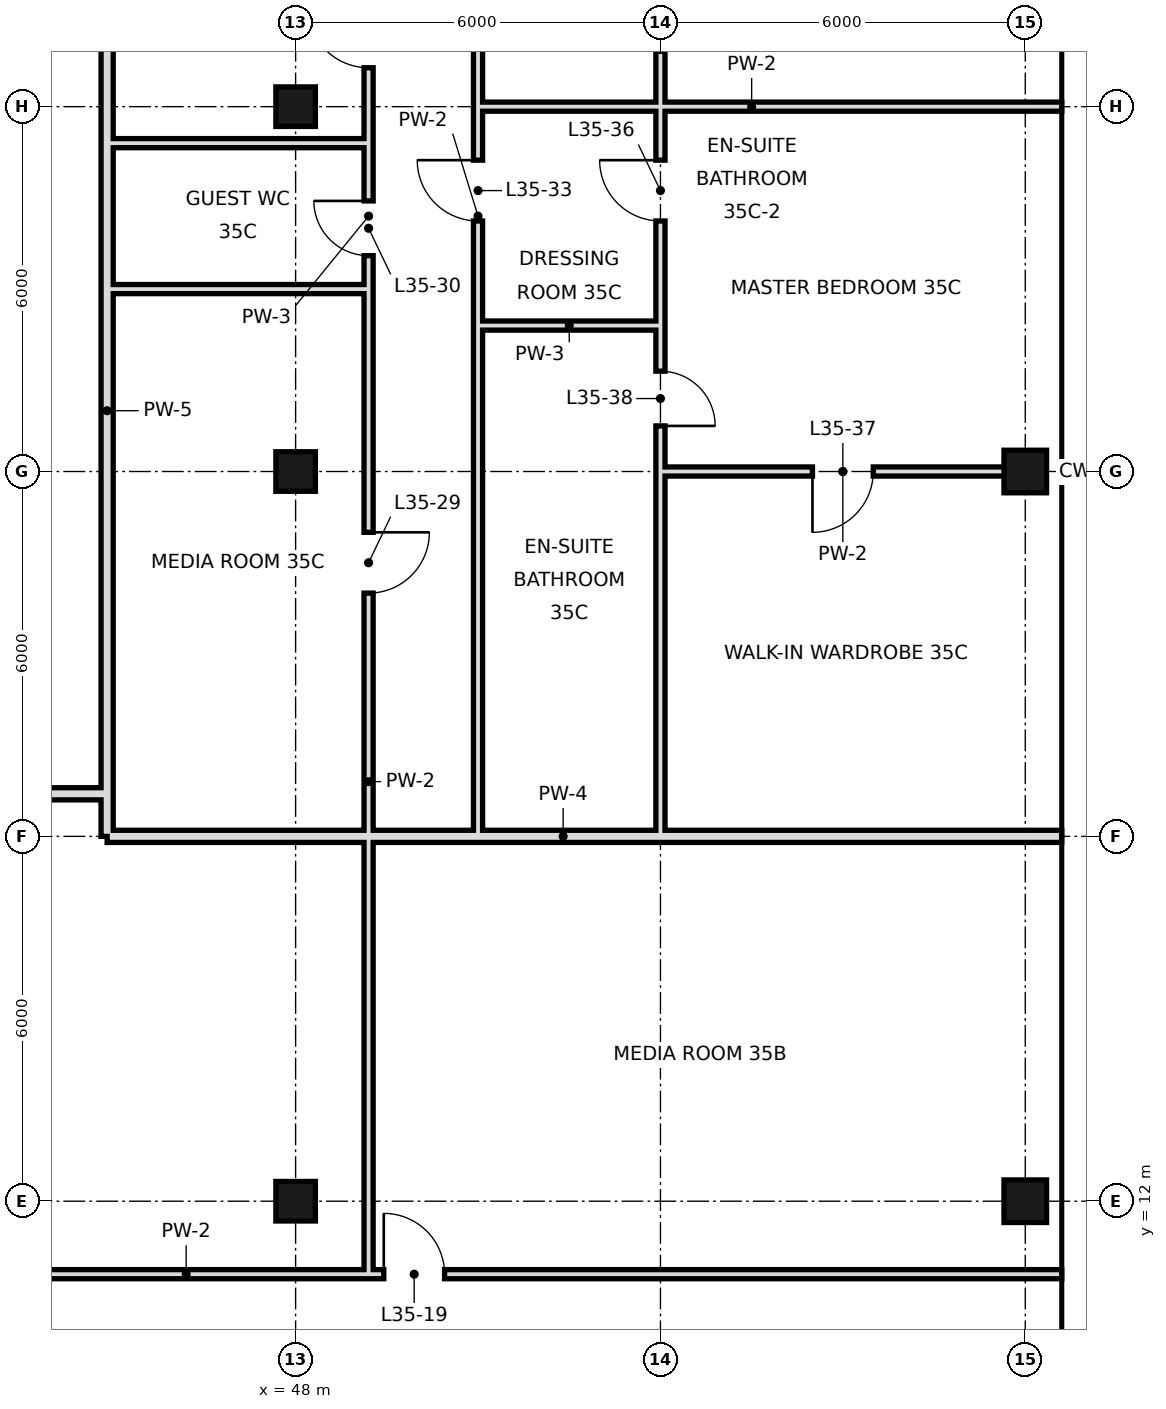
"""IFC4 building model, lengths in metres.
Left out: names, types, materials, properties, quantities, classifications, styles, units other than length and angle.
Written with IfcOpenShell. Run it as: python <this file> out.ifc"""

import sys

from ifc_helpers import new_model, si_unit, direction, frame, frame_2d, origin, origin_2d, place, context, subcontext, project, spatial, rectangle, hollow_rectangle, extrude, element, fill, save


model = new_model("IFC4")
c1 = context("Model", 3, precision=1e-05, world=origin(), true_north=direction((0.0, 1.0)))
c2 = subcontext(c1, "Body", "Model", "MODEL_VIEW")
j1 = project(units=[si_unit("LENGTHUNIT", "METRE"), si_unit("PLANEANGLEUNIT", "RADIAN")], contexts=[c1])
p1 = place(None, origin())
s1 = spatial("IfcSite", under=j1, at=p1, CompositionType="ELEMENT")
p2 = place(p1, origin())
s2 = spatial("IfcBuilding", under=s1, at=p2, CompositionType="ELEMENT")
p3 = place(p2, frame((0.0, 0.0, 154.6)))
s3 = spatial("IfcBuildingStorey", under=s2, at=p3, CompositionType="ELEMENT", Elevation=154.6)
for number, where, z_axis, x_axis in (
    (1, (48.0, 12.0, 0.0), (0.0, 0.0, 1.0), (1.0, 0.0, 0.0)),
    (2, (48.0, 24.0, 0.0), (0.0, 0.0, 1.0), (1.0, 0.0, 0.0)),
    (3, (48.0, 30.0, 0.0), (0.0, 0.0, 1.0), (1.0, 0.0, 0.0)),
):
    element("IfcColumn", number, at=place(p3, frame(where, z_axis=z_axis, x_axis=x_axis)), inside=s3, PredefinedType="COLUMN", context=c2, shape_type="SweptSolid", body=[
        extrude(hollow_rectangle(XDim=0.65, YDim=0.65, WallThickness=0.032, at=origin_2d()), origin(), (0.0, 0.0, 1.0), 3.6),
    ])
for number, where, z_axis, x_axis in (
    (4, (60.0, 12.0, 0.0), (0.0, 0.0, 1.0), (1.0, 0.0, 0.0)),
    (5, (60.0, 24.0, 0.0), (0.0, 0.0, 1.0), (1.0, 0.0, 0.0)),
):
    element("IfcColumn", number, at=place(p3, frame(where, z_axis=z_axis, x_axis=x_axis)), inside=s3, PredefinedType="COLUMN", context=c2, shape_type="SweptSolid", body=[
        extrude(hollow_rectangle(XDim=0.7, YDim=0.7, WallThickness=0.036, at=origin_2d()), origin(), (0.0, 0.0, 1.0), 3.6),
    ])
p4 = place(p3, frame((44.9, 18.7, 0.0), z_axis=(0.0, 0.0, 1.0), x_axis=(0.0, 1.0, 0.0)))
e6 = element("IfcWall", 6, at=p4, inside=s3, PredefinedType="SOLIDWALL", context=c2, shape_type="SweptSolid", body=[
    extrude(rectangle(XDim=25.7, YDim=0.2, at=frame_2d((12.85, 0.0))), origin(), (0.0, 0.0, 1.0), 2.97),
])
p5 = place(p4, frame((12.5, 0.0, 0.0)))
e7 = element("IfcOpeningElement", 7, at=p5, cuts=e6, PredefinedType="OPENING", context=c2, shape_type="SweptSolid", body=[
    extrude(rectangle(XDim=1.2, YDim=2.4, at=frame_2d((0.6, 1.2))), frame((0.0, 0.11, 0.0), z_axis=(0.0, -1.0, 0.0), x_axis=(1.0, 0.0, 0.0)), (0.0, 0.0, 1.0), 0.22),
])
p6 = place(p3, frame((44.9, 18.0, 0.0), z_axis=(0.0, 0.0, 1.0), x_axis=(0.0, 1.0, 0.0)))
e8 = element("IfcWall", 8, at=p6, inside=s3, PredefinedType="SOLIDWALL", context=c2, shape_type="SweptSolid", body=[
    extrude(rectangle(XDim=0.7, YDim=0.2, at=frame_2d((0.35, 0.0))), origin(), (0.0, 0.0, 1.0), 2.97),
])
p7 = place(p3, frame((49.2, 10.8, 0.0), z_axis=(0.0, 0.0, 1.0), x_axis=(0.0, 1.0, 0.0)))
e9 = element("IfcWall", 9, at=p7, inside=s3, PredefinedType="PARTITIONING", context=c2, shape_type="SweptSolid", body=[
    extrude(rectangle(XDim=16.2, YDim=0.15, at=frame_2d((8.1, 0.0))), origin(), (0.0, 0.0, 1.0), 3.42),
])
p8 = place(p7, frame((11.2, 0.0, 0.0)))
e10 = element("IfcOpeningElement", 10, at=p8, cuts=e9, PredefinedType="OPENING", context=c2, shape_type="SweptSolid", body=[
    extrude(rectangle(XDim=1.0, YDim=2.4, at=frame_2d((0.5, 1.2))), frame((0.0, 0.085, 0.0), z_axis=(0.0, -1.0, 0.0), x_axis=(1.0, 0.0, 0.0)), (0.0, 0.0, 1.0), 0.17),
])
p9 = place(p3, frame((49.2, 29.4, 0.0), z_axis=(0.0, 0.0, 1.0), x_axis=(0.0, 1.0, 0.0)))
e11 = element("IfcWall", 11, at=p9, inside=s3, PredefinedType="PARTITIONING", context=c2, shape_type="SweptSolid", body=[
    extrude(rectangle(XDim=15.0, YDim=0.15, at=frame_2d((7.5, 0.0))), origin(), (0.0, 0.0, 1.0), 3.42),
])
p10 = place(p9, frame((1.24, 0.0, 0.0)))
e12 = element("IfcOpeningElement", 12, at=p10, cuts=e11, PredefinedType="OPENING", context=c2, shape_type="SweptSolid", body=[
    extrude(rectangle(XDim=1.0, YDim=2.4, at=frame_2d((0.5, 1.2))), frame((0.0, 0.085, 0.0), z_axis=(0.0, -1.0, 0.0), x_axis=(1.0, 0.0, 0.0)), (0.0, 0.0, 1.0), 0.17),
])
p11 = place(p9, frame((9.4, 0.0, 0.0)))
e13 = element("IfcOpeningElement", 13, at=p11, cuts=e11, PredefinedType="OPENING", context=c2, shape_type="SweptSolid", body=[
    extrude(rectangle(XDim=1.0, YDim=2.4, at=frame_2d((0.5, 1.2))), frame((0.0, 0.085, 0.0), z_axis=(0.0, -1.0, 0.0), x_axis=(1.0, 0.0, 0.0)), (0.0, 0.0, 1.0), 0.17),
])
p12 = place(p3, frame((49.2, 27.0, 0.0), z_axis=(0.0, 0.0, 1.0), x_axis=(0.0, 1.0, 0.0)))
e14 = element("IfcWall", 14, at=p12, inside=s3, PredefinedType="PARTITIONING", context=c2, shape_type="SweptSolid", body=[
    extrude(rectangle(XDim=2.4, YDim=0.15, at=frame_2d((1.2, 0.0))), origin(), (0.0, 0.0, 1.0), 3.42),
])
p13 = place(p12, frame((0.55, 0.0, 0.0)))
e15 = element("IfcOpeningElement", 15, at=p13, cuts=e14, PredefinedType="OPENING", context=c2, shape_type="SweptSolid", body=[
    extrude(rectangle(XDim=0.9, YDim=2.4, at=frame_2d((0.45, 1.2))), frame((0.0, 0.085, 0.0), z_axis=(0.0, -1.0, 0.0), x_axis=(1.0, 0.0, 0.0)), (0.0, 0.0, 1.0), 0.17),
])
p14 = place(p3, frame((51.0, 26.4, 0.0), z_axis=(0.0, 0.0, 1.0), x_axis=(0.0, 1.0, 0.0)))
e16 = element("IfcWall", 16, at=p14, inside=s3, PredefinedType="PARTITIONING", context=c2, shape_type="SweptSolid", body=[
    extrude(rectangle(XDim=3.6, YDim=0.15, at=frame_2d((1.8, 0.0))), origin(), (0.0, 0.0, 1.0), 3.42),
])
p15 = place(p14, frame((1.72, 0.0, 0.0)))
e17 = element("IfcOpeningElement", 17, at=p15, cuts=e16, PredefinedType="OPENING", context=c2, shape_type="SweptSolid", body=[
    extrude(rectangle(XDim=1.0, YDim=2.4, at=frame_2d((0.5, 1.2))), frame((0.0, 0.085, 0.0), z_axis=(0.0, -1.0, 0.0), x_axis=(1.0, 0.0, 0.0)), (0.0, 0.0, 1.0), 0.17),
])
p16 = place(p3, frame((51.0, 18.0, 0.0), z_axis=(0.0, 0.0, 1.0), x_axis=(0.0, 1.0, 0.0)))
e18 = element("IfcWall", 18, at=p16, inside=s3, PredefinedType="PARTITIONING", context=c2, shape_type="SweptSolid", body=[
    extrude(rectangle(XDim=8.4, YDim=0.15, at=frame_2d((4.2, 0.0))), origin(), (0.0, 0.0, 1.0), 3.42),
])
p17 = place(p3, frame((51.0, 30.0, 0.0), z_axis=(0.0, 0.0, 1.0), x_axis=(0.0, 1.0, 0.0)))
e19 = element("IfcWall", 19, at=p17, inside=s3, PredefinedType="PARTITIONING", context=c2, shape_type="SweptSolid", body=[
    extrude(rectangle(XDim=3.6, YDim=0.15, at=frame_2d((1.8, 0.0))), origin(), (0.0, 0.0, 1.0), 3.42),
])
p18 = place(p3, frame((54.0, 26.4, 0.0), z_axis=(0.0, 0.0, 1.0), x_axis=(0.0, 1.0, 0.0)))
e20 = element("IfcWall", 20, at=p18, inside=s3, PredefinedType="PARTITIONING", context=c2, shape_type="SweptSolid", body=[
    extrude(rectangle(XDim=3.6, YDim=0.15, at=frame_2d((1.8, 0.0))), origin(), (0.0, 0.0, 1.0), 3.42),
])
p19 = place(p18, frame((1.72, 0.0, 0.0)))
e21 = element("IfcOpeningElement", 21, at=p19, cuts=e20, PredefinedType="OPENING", context=c2, shape_type="SweptSolid", body=[
    extrude(rectangle(XDim=1.0, YDim=2.4, at=frame_2d((0.5, 1.2))), frame((0.0, 0.085, 0.0), z_axis=(0.0, -1.0, 0.0), x_axis=(1.0, 0.0, 0.0)), (0.0, 0.0, 1.0), 0.17),
])
p20 = place(p3, frame((54.0, 18.0, 0.0), z_axis=(0.0, 0.0, 1.0), x_axis=(0.0, 1.0, 0.0)))
e22 = element("IfcWall", 22, at=p20, inside=s3, PredefinedType="PARTITIONING", context=c2, shape_type="SweptSolid", body=[
    extrude(rectangle(XDim=8.4, YDim=0.15, at=frame_2d((4.2, 0.0))), origin(), (0.0, 0.0, 1.0), 3.42),
])
p21 = place(p20, frame((6.75, 0.0, 0.0)))
e23 = element("IfcOpeningElement", 23, at=p21, cuts=e22, PredefinedType="OPENING", context=c2, shape_type="SweptSolid", body=[
    extrude(rectangle(XDim=0.9, YDim=2.4, at=frame_2d((0.45, 1.2))), frame((0.0, 0.085, 0.0), z_axis=(0.0, -1.0, 0.0), x_axis=(1.0, 0.0, 0.0)), (0.0, 0.0, 1.0), 0.17),
])
p22 = place(p3, frame((54.0, 30.0, 0.0), z_axis=(0.0, 0.0, 1.0), x_axis=(0.0, 1.0, 0.0)))
e24 = element("IfcWall", 24, at=p22, inside=s3, PredefinedType="PARTITIONING", context=c2, shape_type="SweptSolid", body=[
    extrude(rectangle(XDim=3.6, YDim=0.15, at=frame_2d((1.8, 0.0))), origin(), (0.0, 0.0, 1.0), 3.42),
])
p23 = place(p22, frame((0.91, 0.0, 0.0)))
e25 = element("IfcOpeningElement", 25, at=p23, cuts=e24, PredefinedType="OPENING", context=c2, shape_type="SweptSolid", body=[
    extrude(rectangle(XDim=0.9, YDim=2.4, at=frame_2d((0.45, 1.2))), frame((0.0, 0.085, 0.0), z_axis=(0.0, -1.0, 0.0), x_axis=(1.0, 0.0, 0.0)), (0.0, 0.0, 1.0), 0.17),
])
p24 = place(p3, frame((31.8, 10.8, 0.0), z_axis=(0.0, 0.0, 1.0), x_axis=(1.0, 0.0, 0.0)))
e26 = element("IfcWall", 26, at=p24, inside=s3, PredefinedType="PARTITIONING", context=c2, shape_type="SweptSolid", body=[
    extrude(rectangle(XDim=28.8, YDim=0.15, at=frame_2d((14.4, 0.0))), origin(), (0.0, 0.0, 1.0), 3.42),
])
p25 = place(p24, frame((1.6, 0.0, 0.0)))
e27 = element("IfcOpeningElement", 27, at=p25, cuts=e26, PredefinedType="OPENING", context=c2, shape_type="SweptSolid", body=[
    extrude(rectangle(XDim=1.0, YDim=2.4, at=frame_2d((0.5, 1.2))), frame((0.0, 0.085, 0.0), z_axis=(0.0, -1.0, 0.0), x_axis=(1.0, 0.0, 0.0)), (0.0, 0.0, 1.0), 0.17),
])
p26 = place(p24, frame((9.22, 0.0, 0.0)))
e28 = element("IfcOpeningElement", 28, at=p26, cuts=e26, PredefinedType="OPENING", context=c2, shape_type="SweptSolid", body=[
    extrude(rectangle(XDim=1.0, YDim=2.4, at=frame_2d((0.5, 1.2))), frame((0.0, 0.085, 0.0), z_axis=(0.0, -1.0, 0.0), x_axis=(1.0, 0.0, 0.0)), (0.0, 0.0, 1.0), 0.17),
])
p27 = place(p24, frame((17.65, 0.0, 0.0)))
e29 = element("IfcOpeningElement", 29, at=p27, cuts=e26, PredefinedType="OPENING", context=c2, shape_type="SweptSolid", body=[
    extrude(rectangle(XDim=1.0, YDim=2.4, at=frame_2d((0.5, 1.2))), frame((0.0, 0.085, 0.0), z_axis=(0.0, -1.0, 0.0), x_axis=(1.0, 0.0, 0.0)), (0.0, 0.0, 1.0), 0.17),
])
p28 = place(p3, frame((44.9, 18.0, 0.0), z_axis=(0.0, 0.0, 1.0), x_axis=(1.0, 0.0, 0.0)))
e30 = element("IfcWall", 30, at=p28, inside=s3, PredefinedType="SOLIDWALL", context=c2, shape_type="SweptSolid", body=[
    extrude(rectangle(XDim=15.7, YDim=0.2, at=frame_2d((7.85, 0.0))), origin(), (0.0, 0.0, 1.0), 2.72),
])
p29 = place(p3, frame((31.8, 18.7, 0.0), z_axis=(0.0, 0.0, 1.0), x_axis=(1.0, 0.0, 0.0)))
e31 = element("IfcWall", 31, at=p29, inside=s3, PredefinedType="SOLIDWALL", context=c2, shape_type="SweptSolid", body=[
    extrude(rectangle(XDim=13.1, YDim=0.2, at=frame_2d((6.55, 0.0))), origin(), (0.0, 0.0, 1.0), 2.72),
])
p30 = place(p29, frame((1.54, 0.0, 0.0)))
e32 = element("IfcOpeningElement", 32, at=p30, cuts=e31, PredefinedType="OPENING", context=c2, shape_type="SweptSolid", body=[
    extrude(rectangle(XDim=1.2, YDim=2.4, at=frame_2d((0.6, 1.2))), frame((0.0, 0.11, 0.0), z_axis=(0.0, -1.0, 0.0), x_axis=(1.0, 0.0, 0.0)), (0.0, 0.0, 1.0), 0.22),
])
p31 = place(p3, frame((54.0, 24.0, 0.0), z_axis=(0.0, 0.0, 1.0), x_axis=(1.0, 0.0, 0.0)))
e33 = element("IfcWall", 33, at=p31, inside=s3, PredefinedType="PARTITIONING", context=c2, shape_type="SweptSolid", body=[
    extrude(rectangle(XDim=6.0, YDim=0.15, at=frame_2d((3.0, 0.0))), origin(), (0.0, 0.0, 1.0), 2.72),
])
p32 = place(p31, frame((2.5, 0.0, 0.0)))
e34 = element("IfcOpeningElement", 34, at=p32, cuts=e33, PredefinedType="OPENING", context=c2, shape_type="SweptSolid", body=[
    extrude(rectangle(XDim=1.0, YDim=2.4, at=frame_2d((0.5, 1.2))), frame((0.0, 0.085, 0.0), z_axis=(0.0, -1.0, 0.0), x_axis=(1.0, 0.0, 0.0)), (0.0, 0.0, 1.0), 0.17),
])
p33 = place(p3, frame((51.0, 26.4, 0.0), z_axis=(0.0, 0.0, 1.0), x_axis=(1.0, 0.0, 0.0)))
e35 = element("IfcWall", 35, at=p33, inside=s3, PredefinedType="PARTITIONING", context=c2, shape_type="SweptSolid", body=[
    extrude(rectangle(XDim=3.0, YDim=0.15, at=frame_2d((1.5, 0.0))), origin(), (0.0, 0.0, 1.0), 3.42),
])
for number, where, z_axis, x_axis in (
    (36, (44.9, 27.0, 0.0), (0.0, 0.0, 1.0), (1.0, 0.0, 0.0)),
    (37, (44.9, 29.4, 0.0), (0.0, 0.0, 1.0), (1.0, 0.0, 0.0)),
):
    element("IfcWall", number, at=place(p3, frame(where, z_axis=z_axis, x_axis=x_axis)), inside=s3, PredefinedType="PARTITIONING", context=c2, shape_type="SweptSolid", body=[
        extrude(rectangle(XDim=4.3, YDim=0.15, at=frame_2d((2.15, 0.0))), origin(), (0.0, 0.0, 1.0), 3.42),
    ])
p34 = place(p3, frame((54.0, 30.0, 0.0), z_axis=(0.0, 0.0, 1.0), x_axis=(1.0, 0.0, 0.0)))
e38 = element("IfcWall", 38, at=p34, inside=s3, PredefinedType="PARTITIONING", context=c2, shape_type="SweptSolid", body=[
    extrude(rectangle(XDim=6.6, YDim=0.15, at=frame_2d((3.3, 0.0))), origin(), (0.0, 0.0, 1.0), 2.72),
])
p35 = place(p3, frame((51.0, 30.0, 0.0), z_axis=(0.0, 0.0, 1.0), x_axis=(1.0, 0.0, 0.0)))
e39 = element("IfcWall", 39, at=p35, inside=s3, PredefinedType="PARTITIONING", context=c2, shape_type="SweptSolid", body=[
    extrude(rectangle(XDim=3.0, YDim=0.15, at=frame_2d((1.5, 0.0))), origin(), (0.0, 0.0, 1.0), 2.72),
])
p36 = place(p27, origin())
e40 = element("IfcDoor", 40, at=p36, inside=s3, OperationType="SINGLE_SWING_LEFT", PredefinedType="DOOR", context=c2, shape_type="SweptSolid", body=[
    extrude(rectangle(XDim=1.0, YDim=2.4, at=frame_2d((0.5, 1.2))), frame((0.0, 0.025, 0.0), z_axis=(0.0, -1.0, 0.0), x_axis=(1.0, 0.0, 0.0)), (0.0, 0.0, 1.0), 0.05),
])
fill(e29, e40)
p37 = place(p10, frame((1.0, 0.0, 0.0), z_axis=(0.0, 0.0, 1.0), x_axis=(-1.0, 0.0, 0.0)))
e41 = element("IfcDoor", 41, at=p37, inside=s3, OperationType="SINGLE_SWING_LEFT", PredefinedType="DOOR", context=c2, shape_type="SweptSolid", body=[
    extrude(rectangle(XDim=1.0, YDim=2.4, at=frame_2d((0.5, 1.2))), frame((0.0, 0.025, 0.0), z_axis=(0.0, -1.0, 0.0), x_axis=(1.0, 0.0, 0.0)), (0.0, 0.0, 1.0), 0.05),
])
fill(e12, e41)
p38 = place(p8, origin())
e42 = element("IfcDoor", 42, at=p38, inside=s3, OperationType="SINGLE_SWING_RIGHT", PredefinedType="DOOR", context=c2, shape_type="SweptSolid", body=[
    extrude(rectangle(XDim=1.0, YDim=2.4, at=frame_2d((0.5, 1.2))), frame((0.0, 0.025, 0.0), z_axis=(0.0, -1.0, 0.0), x_axis=(1.0, 0.0, 0.0)), (0.0, 0.0, 1.0), 0.05),
])
fill(e10, e42)
p39 = place(p13, frame((0.9, 0.0, 0.0), z_axis=(0.0, 0.0, 1.0), x_axis=(-1.0, 0.0, 0.0)))
e43 = element("IfcDoor", 43, at=p39, inside=s3, OperationType="SINGLE_SWING_LEFT", PredefinedType="DOOR", context=c2, shape_type="SweptSolid", body=[
    extrude(rectangle(XDim=0.9, YDim=2.4, at=frame_2d((0.45, 1.2))), frame((0.0, 0.025, 0.0), z_axis=(0.0, -1.0, 0.0), x_axis=(1.0, 0.0, 0.0)), (0.0, 0.0, 1.0), 0.05),
])
fill(e15, e43)
p40 = place(p15, frame((1.0, 0.0, 0.0), z_axis=(0.0, 0.0, 1.0), x_axis=(-1.0, 0.0, 0.0)))
e44 = element("IfcDoor", 44, at=p40, inside=s3, OperationType="SINGLE_SWING_LEFT", PredefinedType="DOOR", context=c2, shape_type="SweptSolid", body=[
    extrude(rectangle(XDim=1.0, YDim=2.4, at=frame_2d((0.5, 1.2))), frame((0.0, 0.025, 0.0), z_axis=(0.0, -1.0, 0.0), x_axis=(1.0, 0.0, 0.0)), (0.0, 0.0, 1.0), 0.05),
])
fill(e17, e44)
p41 = place(p19, frame((1.0, 0.0, 0.0), z_axis=(0.0, 0.0, 1.0), x_axis=(-1.0, 0.0, 0.0)))
e45 = element("IfcDoor", 45, at=p41, inside=s3, OperationType="SINGLE_SWING_LEFT", PredefinedType="DOOR", context=c2, shape_type="SweptSolid", body=[
    extrude(rectangle(XDim=1.0, YDim=2.4, at=frame_2d((0.5, 1.2))), frame((0.0, 0.025, 0.0), z_axis=(0.0, -1.0, 0.0), x_axis=(1.0, 0.0, 0.0)), (0.0, 0.0, 1.0), 0.05),
])
fill(e21, e45)
p42 = place(p32, frame((1.0, 0.0, 0.0), z_axis=(0.0, 0.0, 1.0), x_axis=(-1.0, 0.0, 0.0)))
e46 = element("IfcDoor", 46, at=p42, inside=s3, OperationType="SINGLE_SWING_RIGHT", PredefinedType="DOOR", context=c2, shape_type="SweptSolid", body=[
    extrude(rectangle(XDim=1.0, YDim=2.4, at=frame_2d((0.5, 1.2))), frame((0.0, 0.025, 0.0), z_axis=(0.0, -1.0, 0.0), x_axis=(1.0, 0.0, 0.0)), (0.0, 0.0, 1.0), 0.05),
])
fill(e34, e46)
p43 = place(p21, frame((0.9, 0.0, 0.0), z_axis=(0.0, 0.0, 1.0), x_axis=(-1.0, 0.0, 0.0)))
e47 = element("IfcDoor", 47, at=p43, inside=s3, OperationType="SINGLE_SWING_RIGHT", PredefinedType="DOOR", context=c2, shape_type="SweptSolid", body=[
    extrude(rectangle(XDim=0.9, YDim=2.4, at=frame_2d((0.45, 1.2))), frame((0.0, 0.025, 0.0), z_axis=(0.0, -1.0, 0.0), x_axis=(1.0, 0.0, 0.0)), (0.0, 0.0, 1.0), 0.05),
])
fill(e23, e47)
save(model, sys.argv[1])
